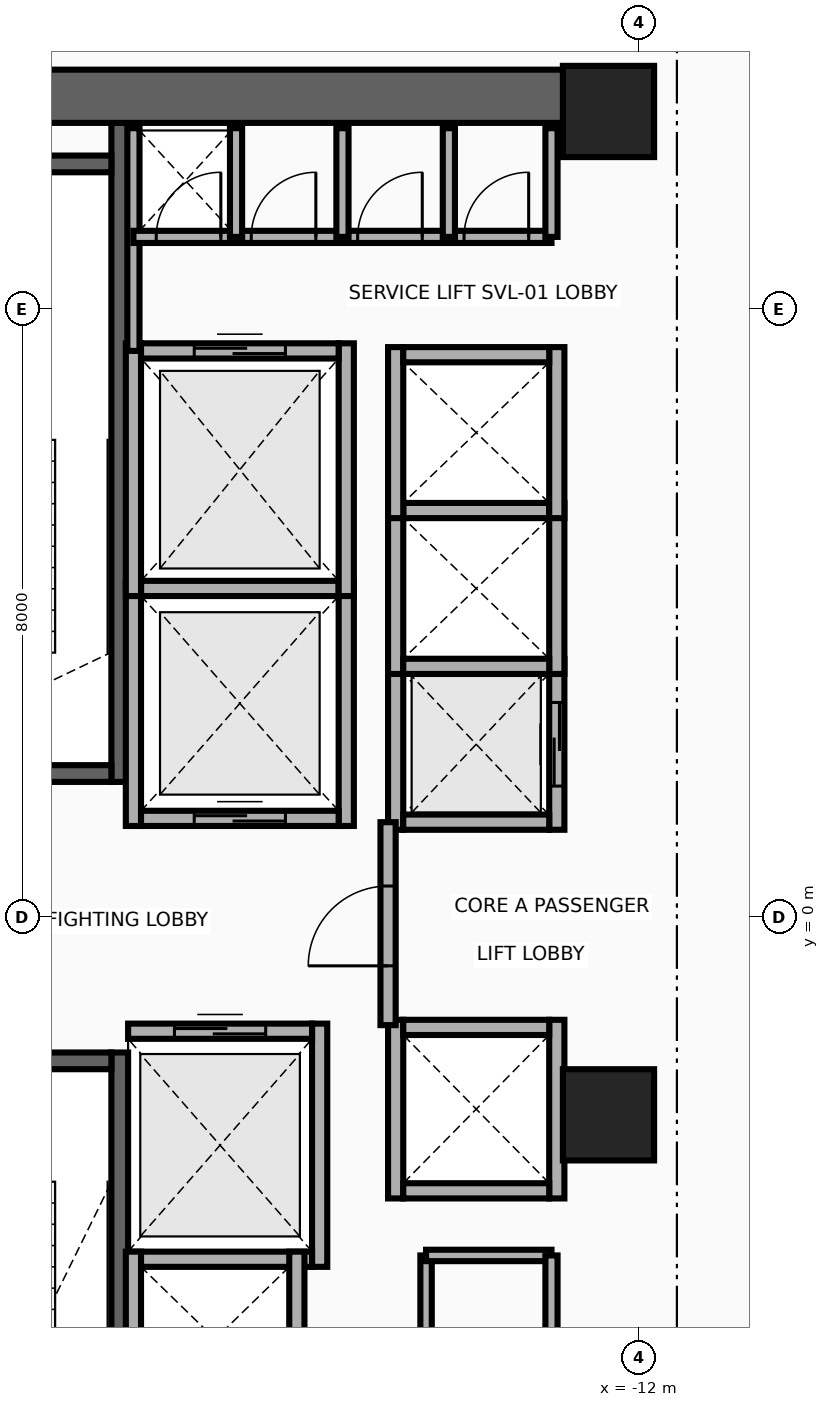
"""IFC4 building model, lengths in metres.
Left out: names, types, materials, properties, quantities, classifications, styles, units other than length and angle.
Written with IfcOpenShell. Run it as: python <this file> out.ifc"""

import sys

from ifc_helpers import new_model, si_unit, direction, frame, frame_2d, origin, origin_2d, place, context, subcontext, project, spatial, rectangle, extrude, source, transform, mapped, element, fill, save


model = new_model("IFC4")
c1 = context("Model", 3, precision=1e-05, world=origin(), true_north=direction((0.0, 1.0)))
c2 = subcontext(c1, "Body", "Model", "MODEL_VIEW")
j1 = project(units=[si_unit("LENGTHUNIT", "METRE"), si_unit("PLANEANGLEUNIT", "RADIAN")], contexts=[c1])
p1 = place(None, origin())
s1 = spatial("IfcSite", under=j1, at=p1, CompositionType="ELEMENT")
p2 = place(p1, origin())
s2 = spatial("IfcBuilding", under=s1, at=p2, CompositionType="ELEMENT")
p3 = place(p2, frame((0.0, 0.0, 124.2)))
s3 = spatial("IfcBuildingStorey", under=s2, at=p3, CompositionType="ELEMENT", Elevation=124.2)
p4 = place(p3, frame((-18.83, 1.78, 0.0), z_axis=(0.0, 0.0, 1.0), x_axis=(0.0, 1.0, 0.0)))
e1 = element("IfcWall", 1, at=p4, inside=s3, PredefinedType="SHEAR", context=c2, shape_type="SweptSolid", body=[
    extrude(rectangle(XDim=8.67, YDim=0.22, at=frame_2d((4.335, 0.0))), origin(), (0.0, 0.0, 1.0), 3.46),
])
p5 = place(p3, frame((-22.05, 1.89, 0.0), z_axis=(0.0, 0.0, 1.0), x_axis=(1.0, 0.0, 0.0)))
e2 = element("IfcWall", 2, at=p5, inside=s3, PredefinedType="SHEAR", context=c2, shape_type="SweptSolid", body=[
    extrude(rectangle(XDim=3.11, YDim=0.22, at=frame_2d((1.555, 0.0))), origin(), (0.0, 0.0, 1.0), 3.46),
])
p6 = place(p5, frame((1.0, 0.0, 0.0)))
e3 = element("IfcOpeningElement", 3, at=p6, cuts=e2, PredefinedType="OPENING", context=c2, shape_type="SweptSolid", body=[
    extrude(rectangle(XDim=1.1, YDim=2.15, at=frame_2d((0.55, 1.075))), frame((0.0, 0.125, 0.0), z_axis=(0.0, -1.0, 0.0), x_axis=(1.0, 0.0, 0.0)), (0.0, 0.0, 1.0), 0.25),
])
p7 = place(p3, frame((-22.05, 9.91, 0.0), z_axis=(0.0, 0.0, 1.0), x_axis=(1.0, 0.0, 0.0)))
e4 = element("IfcWall", 4, at=p7, inside=s3, PredefinedType="SHEAR", context=c2, shape_type="SweptSolid", body=[
    extrude(rectangle(XDim=3.11, YDim=0.22, at=frame_2d((1.555, 0.0))), origin(), (0.0, 0.0, 1.0), 3.46),
])
p8 = place(p3, frame((-18.83, -10.45, 0.0), z_axis=(0.0, 0.0, 1.0), x_axis=(0.0, 1.0, 0.0)))
e5 = element("IfcWall", 5, at=p8, inside=s3, PredefinedType="SHEAR", context=c2, shape_type="SweptSolid", body=[
    extrude(rectangle(XDim=8.67, YDim=0.22, at=frame_2d((4.335, 0.0))), origin(), (0.0, 0.0, 1.0), 3.46),
])
p9 = place(p3, frame((-22.05, -1.89, 0.0), z_axis=(0.0, 0.0, 1.0), x_axis=(1.0, 0.0, 0.0)))
e6 = element("IfcWall", 6, at=p9, inside=s3, PredefinedType="SHEAR", context=c2, shape_type="SweptSolid", body=[
    extrude(rectangle(XDim=3.11, YDim=0.22, at=frame_2d((1.555, 0.0))), origin(), (0.0, 0.0, 1.0), 3.46),
])
p10 = place(p9, frame((1.0, 0.0, 0.0)))
e7 = element("IfcOpeningElement", 7, at=p10, cuts=e6, PredefinedType="OPENING", context=c2, shape_type="SweptSolid", body=[
    extrude(rectangle(XDim=1.1, YDim=2.15, at=frame_2d((0.55, 1.075))), frame((0.0, 0.125, 0.0), z_axis=(0.0, -1.0, 0.0), x_axis=(1.0, 0.0, 0.0)), (0.0, 0.0, 1.0), 0.25),
])
p11 = place(p3, frame((-22.65, 10.8, 0.0), z_axis=(0.0, 0.0, 1.0), x_axis=(1.0, 0.0, 0.0)))
e8 = element("IfcWall", 8, at=p11, inside=s3, PredefinedType="SHEAR", context=c2, shape_type="SweptSolid", body=[
    extrude(rectangle(XDim=10.25, YDim=0.7, at=frame_2d((5.125, 0.0))), origin(), (0.0, 0.0, 1.0), 3.46),
])
m1 = source(origin(), c2, "Body", "SweptSolid", [
    extrude(rectangle(XDim=1.2, YDim=1.2, at=origin_2d()), origin(), (0.0, 0.0, 1.0), 3.7),
])
for number, where, z_axis, x_axis in (
    (9, (-12.4, -2.6, 0.0), (0.0, 0.0, 1.0), (1.0, 0.0, 0.0)),
    (10, (-12.4, 10.6, 0.0), (0.0, 0.0, 1.0), (1.0, 0.0, 0.0)),
):
    element("IfcColumn", number, at=place(p3, frame(where, z_axis=z_axis, x_axis=x_axis)), inside=s3, PredefinedType="COLUMN", context=c2, shape_type="MappedRepresentation", body=[
        mapped(m1, transform((0.0, 0.0, 0.0), x_axis=(1.0, 0.0, 0.0), y_axis=(0.0, 1.0, 0.0), z_axis=(0.0, 0.0, 1.0), scale=1.0)),
    ])
for number, where, z_axis, x_axis in (
    (11, (-18.65, 1.2, 0.0), (0.0, 0.0, 1.0), (0.0, 1.0, 0.0)),
    (12, (-15.85, 1.2, 0.0), (0.0, 0.0, 1.0), (0.0, 1.0, 0.0)),
):
    element("IfcWall", number, at=place(p3, frame(where, z_axis=z_axis, x_axis=x_axis)), inside=s3, PredefinedType="MOVABLE", context=c2, shape_type="SweptSolid", body=[
        extrude(rectangle(XDim=3.225, YDim=0.2, at=frame_2d((1.613, 0.0))), origin(), (0.0, 0.0, 1.0), 3.46),
    ])
p12 = place(p3, frame((-18.55, 1.3, 0.0), z_axis=(0.0, 0.0, 1.0), x_axis=(1.0, 0.0, 0.0)))
e13 = element("IfcWall", 13, at=p12, inside=s3, PredefinedType="MOVABLE", context=c2, shape_type="SweptSolid", body=[
    extrude(rectangle(XDim=2.6, YDim=0.2, at=frame_2d((1.3, 0.0))), origin(), (0.0, 0.0, 1.0), 3.46),
])
p13 = place(p12, frame((0.7, 0.0, 0.0)))
e14 = element("IfcOpeningElement", 14, at=p13, cuts=e13, PredefinedType="OPENING", context=c2, shape_type="SweptSolid", body=[
    extrude(rectangle(XDim=1.2, YDim=2.1, at=frame_2d((0.6, 1.05))), frame((0.0, 0.115, 0.0), z_axis=(0.0, -1.0, 0.0), x_axis=(1.0, 0.0, 0.0)), (0.0, 0.0, 1.0), 0.23),
])
p14 = place(p3, frame((-18.55, 4.325, 0.0), z_axis=(0.0, 0.0, 1.0), x_axis=(1.0, 0.0, 0.0)))
e15 = element("IfcWall", 15, at=p14, inside=s3, PredefinedType="MOVABLE", context=c2, shape_type="SweptSolid", body=[
    extrude(rectangle(XDim=2.6, YDim=0.2, at=frame_2d((1.3, 0.0))), origin(), (0.0, 0.0, 1.0), 3.46),
])
p15 = place(p3, frame((-16.2, -4.6, 0.0), z_axis=(0.0, 0.0, 1.0), x_axis=(0.0, 1.0, 0.0)))
e16 = element("IfcWall", 16, at=p15, inside=s3, PredefinedType="MOVABLE", context=c2, shape_type="SweptSolid", body=[
    extrude(rectangle(XDim=3.2, YDim=0.2, at=frame_2d((1.6, 0.0))), origin(), (0.0, 0.0, 1.0), 3.46),
])
p16 = place(p3, frame((-18.72, -4.5, 0.0), z_axis=(0.0, 0.0, 1.0), x_axis=(1.0, 0.0, 0.0)))
e17 = element("IfcWall", 17, at=p16, inside=s3, PredefinedType="MOVABLE", context=c2, shape_type="SweptSolid", body=[
    extrude(rectangle(XDim=2.42, YDim=0.2, at=frame_2d((1.21, 0.0))), origin(), (0.0, 0.0, 1.0), 3.46),
])
p17 = place(p3, frame((-18.72, -1.5, 0.0), z_axis=(0.0, 0.0, 1.0), x_axis=(1.0, 0.0, 0.0)))
e18 = element("IfcWall", 18, at=p17, inside=s3, PredefinedType="MOVABLE", context=c2, shape_type="SweptSolid", body=[
    extrude(rectangle(XDim=2.42, YDim=0.2, at=frame_2d((1.21, 0.0))), origin(), (0.0, 0.0, 1.0), 3.46),
])
p18 = place(p17, frame((0.61, 0.0, 0.0)))
e19 = element("IfcOpeningElement", 19, at=p18, cuts=e18, PredefinedType="OPENING", context=c2, shape_type="SweptSolid", body=[
    extrude(rectangle(XDim=1.2, YDim=2.1, at=frame_2d((0.6, 1.05))), frame((0.0, 0.115, 0.0), z_axis=(0.0, -1.0, 0.0), x_axis=(1.0, 0.0, 0.0)), (0.0, 0.0, 1.0), 0.23),
])
for number, where, z_axis, x_axis in (
    (20, (-18.65, 4.225, 0.0), (0.0, 0.0, 1.0), (0.0, 1.0, 0.0)),
    (21, (-15.85, 4.225, 0.0), (0.0, 0.0, 1.0), (0.0, 1.0, 0.0)),
):
    element("IfcWall", number, at=place(p3, frame(where, z_axis=z_axis, x_axis=x_axis)), inside=s3, PredefinedType="MOVABLE", context=c2, shape_type="SweptSolid", body=[
        extrude(rectangle(XDim=3.325, YDim=0.2, at=frame_2d((1.663, 0.0))), origin(), (0.0, 0.0, 1.0), 3.46),
    ])
p19 = place(p3, frame((-18.55, 7.45, 0.0), z_axis=(0.0, 0.0, 1.0), x_axis=(1.0, 0.0, 0.0)))
e22 = element("IfcWall", 22, at=p19, inside=s3, PredefinedType="MOVABLE", context=c2, shape_type="SweptSolid", body=[
    extrude(rectangle(XDim=2.6, YDim=0.2, at=frame_2d((1.3, 0.0))), origin(), (0.0, 0.0, 1.0), 3.46),
])
p20 = place(p19, frame((0.7, 0.0, 0.0)))
e23 = element("IfcOpeningElement", 23, at=p20, cuts=e22, PredefinedType="OPENING", context=c2, shape_type="SweptSolid", body=[
    extrude(rectangle(XDim=1.2, YDim=2.1, at=frame_2d((0.6, 1.05))), frame((0.0, 0.115, 0.0), z_axis=(0.0, -1.0, 0.0), x_axis=(1.0, 0.0, 0.0)), (0.0, 0.0, 1.0), 0.23),
])
p21 = place(p3, frame((-15.2, 1.15, 0.0), z_axis=(0.0, 0.0, 1.0), x_axis=(0.0, 1.0, 0.0)))
e24 = element("IfcWall", 24, at=p21, inside=s3, PredefinedType="MOVABLE", context=c2, shape_type="SweptSolid", body=[
    extrude(rectangle(XDim=2.25, YDim=0.2, at=frame_2d((1.125, 0.0))), origin(), (0.0, 0.0, 1.0), 3.46),
])
p22 = place(p3, frame((-13.08, 1.15, 0.0), z_axis=(0.0, 0.0, 1.0), x_axis=(0.0, 1.0, 0.0)))
e25 = element("IfcWall", 25, at=p22, inside=s3, PredefinedType="MOVABLE", context=c2, shape_type="SweptSolid", body=[
    extrude(rectangle(XDim=2.25, YDim=0.2, at=frame_2d((1.125, 0.0))), origin(), (0.0, 0.0, 1.0), 3.46),
])
p23 = place(p22, frame((0.575, 0.0, 0.0)))
e26 = element("IfcOpeningElement", 26, at=p23, cuts=e25, PredefinedType="OPENING", context=c2, shape_type="SweptSolid", body=[
    extrude(rectangle(XDim=1.1, YDim=2.1, at=frame_2d((0.55, 1.05))), frame((0.0, 0.115, 0.0), z_axis=(0.0, -1.0, 0.0), x_axis=(1.0, 0.0, 0.0)), (0.0, 0.0, 1.0), 0.23),
])
p24 = place(p3, frame((-15.1, 1.25, 0.0), z_axis=(0.0, 0.0, 1.0), x_axis=(1.0, 0.0, 0.0)))
e27 = element("IfcWall", 27, at=p24, inside=s3, PredefinedType="MOVABLE", context=c2, shape_type="SweptSolid", body=[
    extrude(rectangle(XDim=1.92, YDim=0.2, at=frame_2d((0.96, 0.0))), origin(), (0.0, 0.0, 1.0), 3.46),
])
for number, where, z_axis, x_axis in (
    (28, (-15.2, 3.2, 0.0), (0.0, 0.0, 1.0), (0.0, 1.0, 0.0)),
    (29, (-13.08, 3.2, 0.0), (0.0, 0.0, 1.0), (0.0, 1.0, 0.0)),
):
    element("IfcWall", number, at=place(p3, frame(where, z_axis=z_axis, x_axis=x_axis)), inside=s3, PredefinedType="MOVABLE", context=c2, shape_type="SweptSolid", body=[
        extrude(rectangle(XDim=2.25, YDim=0.2, at=frame_2d((1.125, 0.0))), origin(), (0.0, 0.0, 1.0), 3.46),
    ])
for number, where, z_axis, x_axis in (
    (30, (-15.1, 3.3, 0.0), (0.0, 0.0, 1.0), (1.0, 0.0, 0.0)),
    (31, (-15.1, 5.35, 0.0), (0.0, 0.0, 1.0), (1.0, 0.0, 0.0)),
):
    element("IfcWall", number, at=place(p3, frame(where, z_axis=z_axis, x_axis=x_axis)), inside=s3, PredefinedType="MOVABLE", context=c2, shape_type="SweptSolid", body=[
        extrude(rectangle(XDim=1.92, YDim=0.2, at=frame_2d((0.96, 0.0))), origin(), (0.0, 0.0, 1.0), 3.46),
    ])
for number, where, z_axis, x_axis in (
    (32, (-15.2, 5.25, 0.0), (0.0, 0.0, 1.0), (0.0, 1.0, 0.0)),
    (33, (-13.08, 5.25, 0.0), (0.0, 0.0, 1.0), (0.0, 1.0, 0.0)),
):
    element("IfcWall", number, at=place(p3, frame(where, z_axis=z_axis, x_axis=x_axis)), inside=s3, PredefinedType="MOVABLE", context=c2, shape_type="SweptSolid", body=[
        extrude(rectangle(XDim=2.25, YDim=0.2, at=frame_2d((1.125, 0.0))), origin(), (0.0, 0.0, 1.0), 3.46),
    ])
p25 = place(p3, frame((-15.1, 7.4, 0.0), z_axis=(0.0, 0.0, 1.0), x_axis=(1.0, 0.0, 0.0)))
e34 = element("IfcWall", 34, at=p25, inside=s3, PredefinedType="MOVABLE", context=c2, shape_type="SweptSolid", body=[
    extrude(rectangle(XDim=1.92, YDim=0.2, at=frame_2d((0.96, 0.0))), origin(), (0.0, 0.0, 1.0), 3.46),
])
for number, where, z_axis, x_axis in (
    (35, (-18.65, -6.7, 0.0), (0.0, 0.0, 1.0), (0.0, 1.0, 0.0)),
    (36, (-16.5, -6.7, 0.0), (0.0, 0.0, 1.0), (0.0, 1.0, 0.0)),
):
    element("IfcWall", number, at=place(p3, frame(where, z_axis=z_axis, x_axis=x_axis)), inside=s3, PredefinedType="MOVABLE", context=c2, shape_type="SweptSolid", body=[
        extrude(rectangle(XDim=2.3, YDim=0.2, at=frame_2d((1.15, 0.0))), origin(), (0.0, 0.0, 1.0), 3.46),
    ])
for number, where, z_axis, x_axis in (
    (37, (-15.2, -3.7, 0.0), (0.0, 0.0, 1.0), (0.0, 1.0, 0.0)),
    (38, (-13.08, -3.7, 0.0), (0.0, 0.0, 1.0), (0.0, 1.0, 0.0)),
):
    element("IfcWall", number, at=place(p3, frame(where, z_axis=z_axis, x_axis=x_axis)), inside=s3, PredefinedType="MOVABLE", context=c2, shape_type="SweptSolid", body=[
        extrude(rectangle(XDim=2.35, YDim=0.2, at=frame_2d((1.175, 0.0))), origin(), (0.0, 0.0, 1.0), 3.46),
    ])
for number, where, z_axis, x_axis in (
    (39, (-15.1, -3.6, 0.0), (0.0, 0.0, 1.0), (1.0, 0.0, 0.0)),
    (40, (-15.1, -1.45, 0.0), (0.0, 0.0, 1.0), (1.0, 0.0, 0.0)),
):
    element("IfcWall", number, at=place(p3, frame(where, z_axis=z_axis, x_axis=x_axis)), inside=s3, PredefinedType="MOVABLE", context=c2, shape_type="SweptSolid", body=[
        extrude(rectangle(XDim=1.92, YDim=0.2, at=frame_2d((0.96, 0.0))), origin(), (0.0, 0.0, 1.0), 3.46),
    ])
p26 = place(p3, frame((-15.3, -1.42, 0.0), z_axis=(0.0, 0.0, 1.0), x_axis=(0.0, 1.0, 0.0)))
e41 = element("IfcWall", 41, at=p26, inside=s3, PredefinedType="PARTITIONING", context=c2, shape_type="SweptSolid", body=[
    extrude(rectangle(XDim=2.67, YDim=0.2, at=frame_2d((1.335, 0.0))), origin(), (0.0, 0.0, 1.0), 3.46),
])
p27 = place(p26, frame((0.78, 0.0, 0.0)))
e42 = element("IfcOpeningElement", 42, at=p27, cuts=e41, PredefinedType="OPENING", context=c2, shape_type="SweptSolid", body=[
    extrude(rectangle(XDim=1.05, YDim=2.15, at=frame_2d((0.525, 1.075))), frame((0.0, 0.115, 0.0), z_axis=(0.0, -1.0, 0.0), x_axis=(1.0, 0.0, 0.0)), (0.0, 0.0, 1.0), 0.23),
])
p28 = place(p3, frame((-18.65, 7.45, 0.0), z_axis=(0.0, 0.0, 1.0), x_axis=(0.0, 1.0, 0.0)))
e43 = element("IfcWall", 43, at=p28, inside=s3, PredefinedType="PARTITIONING", context=c2, shape_type="SweptSolid", body=[
    extrude(rectangle(XDim=2.93, YDim=0.16, at=frame_2d((1.465, 0.0))), origin(), (0.0, 0.0, 1.0), 3.46),
])
p29 = place(p3, frame((-18.65, 8.95, 0.0), z_axis=(0.0, 0.0, 1.0), x_axis=(1.0, 0.0, 0.0)))
e44 = element("IfcWall", 44, at=p29, inside=s3, PredefinedType="PARTITIONING", context=c2, shape_type="SweptSolid", body=[
    extrude(rectangle(XDim=5.5, YDim=0.16, at=frame_2d((2.75, 0.0))), origin(), (0.0, 0.0, 1.0), 3.46),
])
p30 = place(p29, frame((0.3, 0.0, 0.0)))
e45 = element("IfcOpeningElement", 45, at=p30, cuts=e44, PredefinedType="OPENING", context=c2, shape_type="SweptSolid", body=[
    extrude(rectangle(XDim=0.85, YDim=2.05, at=frame_2d((0.425, 1.025))), frame((0.0, 0.095, 0.0), z_axis=(0.0, -1.0, 0.0), x_axis=(1.0, 0.0, 0.0)), (0.0, 0.0, 1.0), 0.19),
])
p31 = place(p29, frame((1.55, 0.0, 0.0)))
e46 = element("IfcOpeningElement", 46, at=p31, cuts=e44, PredefinedType="OPENING", context=c2, shape_type="SweptSolid", body=[
    extrude(rectangle(XDim=0.85, YDim=2.05, at=frame_2d((0.425, 1.025))), frame((0.0, 0.095, 0.0), z_axis=(0.0, -1.0, 0.0), x_axis=(1.0, 0.0, 0.0)), (0.0, 0.0, 1.0), 0.19),
])
p32 = place(p29, frame((2.95, 0.0, 0.0)))
e47 = element("IfcOpeningElement", 47, at=p32, cuts=e44, PredefinedType="OPENING", context=c2, shape_type="SweptSolid", body=[
    extrude(rectangle(XDim=0.85, YDim=2.05, at=frame_2d((0.425, 1.025))), frame((0.0, 0.095, 0.0), z_axis=(0.0, -1.0, 0.0), x_axis=(1.0, 0.0, 0.0)), (0.0, 0.0, 1.0), 0.19),
])
p33 = place(p29, frame((4.35, 0.0, 0.0)))
e48 = element("IfcOpeningElement", 48, at=p33, cuts=e44, PredefinedType="OPENING", context=c2, shape_type="SweptSolid", body=[
    extrude(rectangle(XDim=0.85, YDim=2.05, at=frame_2d((0.425, 1.025))), frame((0.0, 0.095, 0.0), z_axis=(0.0, -1.0, 0.0), x_axis=(1.0, 0.0, 0.0)), (0.0, 0.0, 1.0), 0.19),
])
for number, where, z_axis, x_axis in (
    (49, (-13.15, 8.95, 0.0), (0.0, 0.0, 1.0), (0.0, 1.0, 0.0)),
    (50, (-17.3, 8.95, 0.0), (0.0, 0.0, 1.0), (0.0, 1.0, 0.0)),
    (51, (-15.9, 8.95, 0.0), (0.0, 0.0, 1.0), (0.0, 1.0, 0.0)),
    (52, (-14.5, 8.95, 0.0), (0.0, 0.0, 1.0), (0.0, 1.0, 0.0)),
):
    element("IfcWall", number, at=place(p3, frame(where, z_axis=z_axis, x_axis=x_axis)), inside=s3, PredefinedType="PARTITIONING", context=c2, shape_type="SweptSolid", body=[
        extrude(rectangle(XDim=1.43, YDim=0.16, at=frame_2d((0.715, 0.0))), origin(), (0.0, 0.0, 1.0), 3.46),
    ])
p34 = place(p3, frame((-14.8, -6.58, 0.0), z_axis=(0.0, 0.0, 1.0), x_axis=(0.0, 1.0, 0.0)))
e53 = element("IfcWall", 53, at=p34, inside=s3, PredefinedType="PARTITIONING", context=c2, shape_type="SweptSolid", body=[
    extrude(rectangle(XDim=2.13, YDim=0.15, at=frame_2d((1.065, 0.0))), origin(), (0.0, 0.0, 1.0), 3.46),
])
p35 = place(p3, frame((-14.8, -4.45, 0.0), z_axis=(0.0, 0.0, 1.0), x_axis=(1.0, 0.0, 0.0)))
e54 = element("IfcWall", 54, at=p35, inside=s3, PredefinedType="PARTITIONING", context=c2, shape_type="SweptSolid", body=[
    extrude(rectangle(XDim=1.65, YDim=0.15, at=frame_2d((0.825, 0.0))), origin(), (0.0, 0.0, 1.0), 3.46),
])
p36 = place(p3, frame((-13.15, -6.58, 0.0), z_axis=(0.0, 0.0, 1.0), x_axis=(0.0, 1.0, 0.0)))
e55 = element("IfcWall", 55, at=p36, inside=s3, PredefinedType="PARTITIONING", context=c2, shape_type="SweptSolid", body=[
    extrude(rectangle(XDim=2.13, YDim=0.16, at=frame_2d((1.065, 0.0))), origin(), (0.0, 0.0, 1.0), 3.46),
])
p37 = place(p13, origin())
e56 = element("IfcDoor", 56, at=p37, inside=s3, OperationType="DOUBLE_DOOR_SLIDING", PredefinedType="DOOR", context=c2, shape_type="SweptSolid", body=[
    extrude(rectangle(XDim=1.2, YDim=2.1, at=frame_2d((0.6, 1.05))), frame((0.0, 0.025, 0.0), z_axis=(0.0, -1.0, 0.0), x_axis=(1.0, 0.0, 0.0)), (0.0, 0.0, 1.0), 0.05),
])
fill(e14, e56)
p38 = place(p18, origin())
e57 = element("IfcDoor", 57, at=p38, inside=s3, OperationType="DOUBLE_DOOR_SLIDING", PredefinedType="DOOR", context=c2, shape_type="SweptSolid", body=[
    extrude(rectangle(XDim=1.2, YDim=2.1, at=frame_2d((0.6, 1.05))), frame((0.0, 0.025, 0.0), z_axis=(0.0, -1.0, 0.0), x_axis=(1.0, 0.0, 0.0)), (0.0, 0.0, 1.0), 0.05),
])
fill(e19, e57)
p39 = place(p20, origin())
e58 = element("IfcDoor", 58, at=p39, inside=s3, OperationType="DOUBLE_DOOR_SLIDING", PredefinedType="DOOR", context=c2, shape_type="SweptSolid", body=[
    extrude(rectangle(XDim=1.2, YDim=2.1, at=frame_2d((0.6, 1.05))), frame((0.0, 0.025, 0.0), z_axis=(0.0, -1.0, 0.0), x_axis=(1.0, 0.0, 0.0)), (0.0, 0.0, 1.0), 0.05),
])
fill(e23, e58)
p40 = place(p23, origin())
e59 = element("IfcDoor", 59, at=p40, inside=s3, OperationType="DOUBLE_DOOR_SLIDING", PredefinedType="DOOR", context=c2, shape_type="SweptSolid", body=[
    extrude(rectangle(XDim=1.1, YDim=2.1, at=frame_2d((0.55, 1.05))), frame((0.0, 0.025, 0.0), z_axis=(0.0, -1.0, 0.0), x_axis=(1.0, 0.0, 0.0)), (0.0, 0.0, 1.0), 0.05),
])
fill(e26, e59)
p41 = place(p27, origin())
e60 = element("IfcDoor", 60, at=p41, inside=s3, OperationType="SINGLE_SWING_RIGHT", PredefinedType="DOOR", context=c2, shape_type="SweptSolid", body=[
    extrude(rectangle(XDim=1.05, YDim=2.15, at=frame_2d((0.525, 1.075))), frame((0.0, 0.025, 0.0), z_axis=(0.0, -1.0, 0.0), x_axis=(1.0, 0.0, 0.0)), (0.0, 0.0, 1.0), 0.05),
])
fill(e42, e60)
p42 = place(p30, origin())
e61 = element("IfcDoor", 61, at=p42, inside=s3, OperationType="SINGLE_SWING_LEFT", PredefinedType="DOOR", context=c2, shape_type="SweptSolid", body=[
    extrude(rectangle(XDim=0.85, YDim=2.05, at=frame_2d((0.425, 1.025))), frame((0.0, 0.025, 0.0), z_axis=(0.0, -1.0, 0.0), x_axis=(1.0, 0.0, 0.0)), (0.0, 0.0, 1.0), 0.05),
])
fill(e45, e61)
p43 = place(p31, origin())
e62 = element("IfcDoor", 62, at=p43, inside=s3, OperationType="SINGLE_SWING_RIGHT", PredefinedType="DOOR", context=c2, shape_type="SweptSolid", body=[
    extrude(rectangle(XDim=0.85, YDim=2.05, at=frame_2d((0.425, 1.025))), frame((0.0, 0.025, 0.0), z_axis=(0.0, -1.0, 0.0), x_axis=(1.0, 0.0, 0.0)), (0.0, 0.0, 1.0), 0.05),
])
fill(e46, e62)
p44 = place(p32, origin())
e63 = element("IfcDoor", 63, at=p44, inside=s3, OperationType="SINGLE_SWING_LEFT", PredefinedType="DOOR", context=c2, shape_type="SweptSolid", body=[
    extrude(rectangle(XDim=0.85, YDim=2.05, at=frame_2d((0.425, 1.025))), frame((0.0, 0.025, 0.0), z_axis=(0.0, -1.0, 0.0), x_axis=(1.0, 0.0, 0.0)), (0.0, 0.0, 1.0), 0.05),
])
fill(e47, e63)
p45 = place(p33, origin())
e64 = element("IfcDoor", 64, at=p45, inside=s3, OperationType="SINGLE_SWING_RIGHT", PredefinedType="DOOR", context=c2, shape_type="SweptSolid", body=[
    extrude(rectangle(XDim=0.85, YDim=2.05, at=frame_2d((0.425, 1.025))), frame((0.0, 0.025, 0.0), z_axis=(0.0, -1.0, 0.0), x_axis=(1.0, 0.0, 0.0)), (0.0, 0.0, 1.0), 0.05),
])
fill(e48, e64)
save(model, sys.argv[1])
